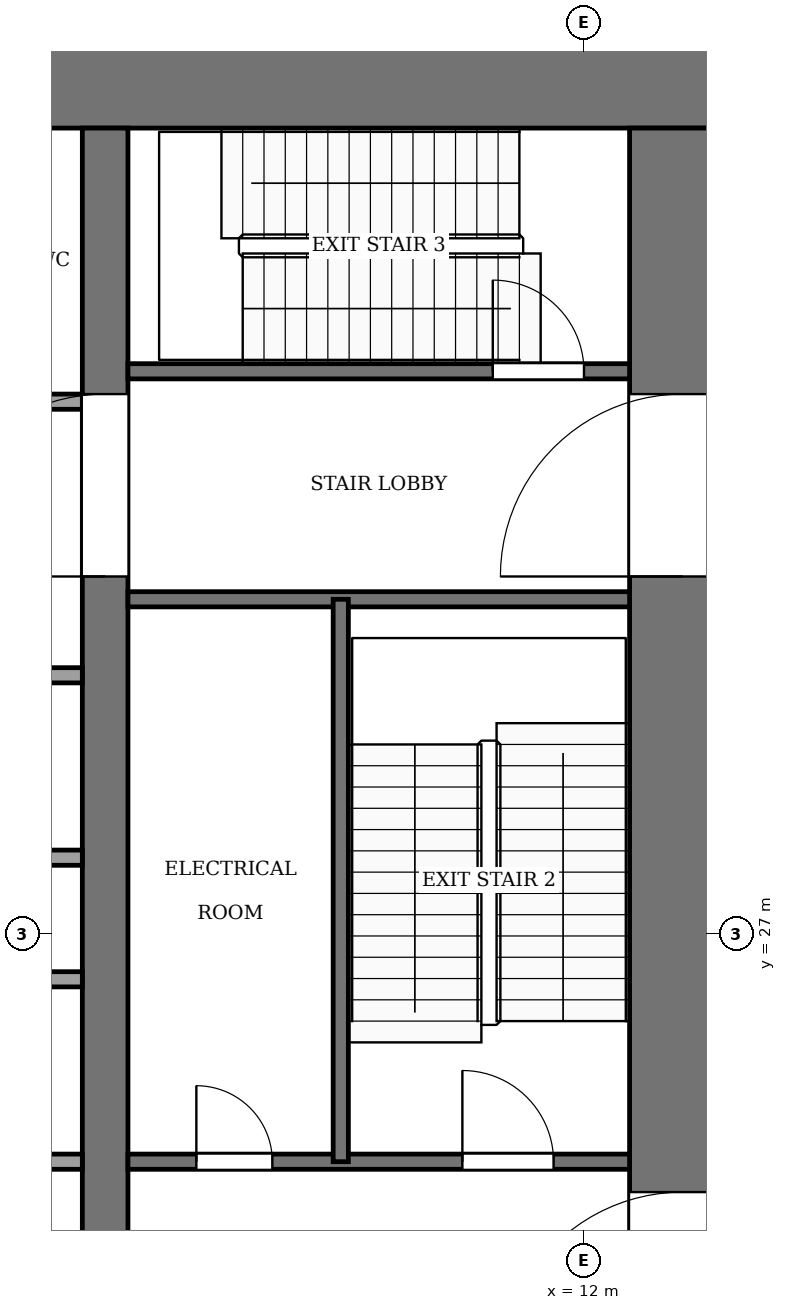
"""IFC4 building model, lengths in metres.
Left out: names, types, materials, properties, quantities, classifications, styles, units other than length and angle.
Written with IfcOpenShell. Run it as: python <this file> out.ifc"""

import sys

from ifc_helpers import new_model, si_unit, direction, frame, frame_2d, origin, place, context, subcontext, project, spatial, rectangle, extrude, element, fill, save


model = new_model("IFC4")
c1 = context("Model", 3, precision=1e-05, world=origin(), true_north=direction((0.0, 1.0)))
c2 = subcontext(c1, "Body", "Model", "MODEL_VIEW")
j1 = project(units=[si_unit("LENGTHUNIT", "METRE"), si_unit("PLANEANGLEUNIT", "RADIAN")], contexts=[c1])
p1 = place(None, origin())
s1 = spatial("IfcSite", under=j1, at=p1, CompositionType="ELEMENT")
p2 = place(p1, origin())
s2 = spatial("IfcBuilding", under=s1, at=p2, CompositionType="ELEMENT")
p3 = place(p2, frame((0.0, 0.0, 9.0)))
s3 = spatial("IfcBuildingStorey", under=s2, at=p3, CompositionType="ELEMENT", Elevation=9.0)
p4 = place(p3, frame((-14.0, 38.3, -0.13), z_axis=(0.0, 0.0, 1.0), x_axis=(1.0, 0.0, 0.0)))
e1 = element("IfcWall", 1, at=p4, inside=s3, PredefinedType="SHEAR", context=c2, shape_type="SweptSolid", body=[
    extrude(rectangle(XDim=28.0, YDim=1.4, at=frame_2d((14.0, 0.0))), origin(), (0.0, 0.0, 1.0), 5.0),
])
p5 = place(p3, frame((13.3, 18.4, -0.13), z_axis=(0.0, 0.0, 1.0), x_axis=(0.0, 1.0, 0.0)))
e2 = element("IfcWall", 2, at=p5, inside=s3, PredefinedType="SHEAR", context=c2, shape_type="SweptSolid", body=[
    extrude(rectangle(XDim=19.2, YDim=1.4, at=frame_2d((9.6, 0.0))), origin(), (0.0, 0.0, 1.0), 5.0),
])
p6 = place(p5, frame((2.8, 0.0, 0.13)))
e3 = element("IfcOpeningElement", 3, at=p6, cuts=e2, PredefinedType="OPENING", context=c2, shape_type="SweptSolid", body=[
    extrude(rectangle(XDim=2.4, YDim=2.4, at=frame_2d((1.2, 1.2))), frame((0.0, 0.71, 0.0), z_axis=(0.0, -1.0, 0.0), x_axis=(1.0, 0.0, 0.0)), (0.0, 0.0, 1.0), 1.42),
])
p7 = place(p5, frame((13.3, 0.0, 0.13)))
e4 = element("IfcOpeningElement", 4, at=p7, cuts=e2, PredefinedType="OPENING", context=c2, shape_type="SweptSolid", body=[
    extrude(rectangle(XDim=2.4, YDim=2.4, at=frame_2d((1.2, 1.2))), frame((0.0, 0.71, 0.0), z_axis=(0.0, -1.0, 0.0), x_axis=(1.0, 0.0, 0.0)), (0.0, 0.0, 1.0), 1.42),
])
p8 = place(p3, frame((5.7, 18.4, -0.13), z_axis=(0.0, 0.0, 1.0), x_axis=(0.0, 1.0, 0.0)))
e5 = element("IfcWall", 5, at=p8, inside=s3, PredefinedType="SHEAR", context=c2, shape_type="SweptSolid", body=[
    extrude(rectangle(XDim=19.2, YDim=0.6, at=frame_2d((9.6, 0.0))), origin(), (0.0, 0.0, 1.0), 5.0),
])
p9 = place(p8, frame((13.3, 0.0, 0.13)))
e6 = element("IfcOpeningElement", 6, at=p9, cuts=e5, PredefinedType="OPENING", context=c2, shape_type="SweptSolid", body=[
    extrude(rectangle(XDim=2.4, YDim=2.4, at=frame_2d((1.2, 1.2))), frame((0.0, 0.31, 0.0), z_axis=(0.0, -1.0, 0.0), x_axis=(1.0, 0.0, 0.0)), (0.0, 0.0, 1.0), 0.62),
])
p10 = place(p3, frame((-5.4, 24.0, 0.0), z_axis=(0.0, 0.0, 1.0), x_axis=(1.0, 0.0, 0.0)))
e7 = element("IfcWall", 7, at=p10, inside=s3, PredefinedType="PARTITIONING", context=c2, shape_type="SweptSolid", body=[
    extrude(rectangle(XDim=10.8, YDim=0.2, at=frame_2d((5.4, 0.0))), origin(), (0.0, 0.0, 1.0), 4.87),
])
p11 = place(p10, frame((0.75, 0.0, 0.0)))
e8 = element("IfcOpeningElement", 8, at=p11, cuts=e7, PredefinedType="OPENING", context=c2, shape_type="SweptSolid", body=[
    extrude(rectangle(XDim=1.2, YDim=2.2, at=frame_2d((0.6, 1.1))), frame((0.0, 0.11, 0.0), z_axis=(0.0, -1.0, 0.0), x_axis=(1.0, 0.0, 0.0)), (0.0, 0.0, 1.0), 0.22),
])
p12 = place(p10, frame((3.45, 0.0, 0.0)))
e9 = element("IfcOpeningElement", 9, at=p12, cuts=e7, PredefinedType="OPENING", context=c2, shape_type="SweptSolid", body=[
    extrude(rectangle(XDim=1.2, YDim=2.2, at=frame_2d((0.6, 1.1))), frame((0.0, 0.11, 0.0), z_axis=(0.0, -1.0, 0.0), x_axis=(1.0, 0.0, 0.0)), (0.0, 0.0, 1.0), 0.22),
])
p13 = place(p10, frame((6.15, 0.0, 0.0)))
e10 = element("IfcOpeningElement", 10, at=p13, cuts=e7, PredefinedType="OPENING", context=c2, shape_type="SweptSolid", body=[
    extrude(rectangle(XDim=1.2, YDim=2.2, at=frame_2d((0.6, 1.1))), frame((0.0, 0.11, 0.0), z_axis=(0.0, -1.0, 0.0), x_axis=(1.0, 0.0, 0.0)), (0.0, 0.0, 1.0), 0.22),
])
p14 = place(p10, frame((8.85, 0.0, 0.0)))
e11 = element("IfcOpeningElement", 11, at=p14, cuts=e7, PredefinedType="OPENING", context=c2, shape_type="SweptSolid", body=[
    extrude(rectangle(XDim=1.2, YDim=2.2, at=frame_2d((0.6, 1.1))), frame((0.0, 0.11, 0.0), z_axis=(0.0, -1.0, 0.0), x_axis=(1.0, 0.0, 0.0)), (0.0, 0.0, 1.0), 0.22),
])
p15 = place(p3, frame((6.0, 24.0, 0.0), z_axis=(0.0, 0.0, 1.0), x_axis=(1.0, 0.0, 0.0)))
e12 = element("IfcWall", 12, at=p15, inside=s3, PredefinedType="PARTITIONING", context=c2, shape_type="SweptSolid", body=[
    extrude(rectangle(XDim=6.6, YDim=0.2, at=frame_2d((3.3, 0.0))), origin(), (0.0, 0.0, 1.0), 4.87),
])
p16 = place(p15, frame((0.9, 0.0, 0.0)))
e13 = element("IfcOpeningElement", 13, at=p16, cuts=e12, PredefinedType="OPENING", context=c2, shape_type="SweptSolid", body=[
    extrude(rectangle(XDim=1.0, YDim=2.1, at=frame_2d((0.5, 1.05))), frame((0.0, 0.11, 0.0), z_axis=(0.0, -1.0, 0.0), x_axis=(1.0, 0.0, 0.0)), (0.0, 0.0, 1.0), 0.22),
])
p17 = place(p15, frame((4.4, 0.0, 0.0)))
e14 = element("IfcOpeningElement", 14, at=p17, cuts=e12, PredefinedType="OPENING", context=c2, shape_type="SweptSolid", body=[
    extrude(rectangle(XDim=1.2, YDim=2.2, at=frame_2d((0.6, 1.1))), frame((0.0, 0.11, 0.0), z_axis=(0.0, -1.0, 0.0), x_axis=(1.0, 0.0, 0.0)), (0.0, 0.0, 1.0), 0.22),
])
for number, where, z_axis, x_axis in (
    (15, (-5.4, 26.4, 0.0), (0.0, 0.0, 1.0), (1.0, 0.0, 0.0)),
    (16, (-5.4, 28.0, 0.0), (0.0, 0.0, 1.0), (1.0, 0.0, 0.0)),
    (17, (-5.4, 30.4, 0.0), (0.0, 0.0, 1.0), (1.0, 0.0, 0.0)),
):
    element("IfcWall", number, at=place(p3, frame(where, z_axis=z_axis, x_axis=x_axis)), inside=s3, PredefinedType="PARTITIONING", context=c2, shape_type="SweptSolid", body=[
        extrude(rectangle(XDim=10.8, YDim=0.2, at=frame_2d((5.4, 0.0))), origin(), (0.0, 0.0, 1.0), 4.87),
    ])
p18 = place(p3, frame((6.0, 31.4, 0.0), z_axis=(0.0, 0.0, 1.0), x_axis=(1.0, 0.0, 0.0)))
e18 = element("IfcWall", 18, at=p18, inside=s3, PredefinedType="PARTITIONING", context=c2, shape_type="SweptSolid", body=[
    extrude(rectangle(XDim=6.6, YDim=0.2, at=frame_2d((3.3, 0.0))), origin(), (0.0, 0.0, 1.0), 4.87),
])
p19 = place(p3, frame((-5.4, 34.0, 0.0), z_axis=(0.0, 0.0, 1.0), x_axis=(1.0, 0.0, 0.0)))
e19 = element("IfcWall", 19, at=p19, inside=s3, PredefinedType="PARTITIONING", context=c2, shape_type="SweptSolid", body=[
    extrude(rectangle(XDim=10.8, YDim=0.2, at=frame_2d((5.4, 0.0))), origin(), (0.0, 0.0, 1.0), 4.87),
])
p20 = place(p19, frame((6.15, 0.0, 0.0)))
e20 = element("IfcOpeningElement", 20, at=p20, cuts=e19, PredefinedType="OPENING", context=c2, shape_type="SweptSolid", body=[
    extrude(rectangle(XDim=1.2, YDim=2.2, at=frame_2d((0.6, 1.1))), frame((0.0, 0.11, 0.0), z_axis=(0.0, -1.0, 0.0), x_axis=(1.0, 0.0, 0.0)), (0.0, 0.0, 1.0), 0.22),
])
p21 = place(p19, frame((8.95, 0.0, 0.0)))
e21 = element("IfcOpeningElement", 21, at=p21, cuts=e19, PredefinedType="OPENING", context=c2, shape_type="SweptSolid", body=[
    extrude(rectangle(XDim=1.0, YDim=2.1, at=frame_2d((0.5, 1.05))), frame((0.0, 0.11, 0.0), z_axis=(0.0, -1.0, 0.0), x_axis=(1.0, 0.0, 0.0)), (0.0, 0.0, 1.0), 0.22),
])
p22 = place(p3, frame((6.0, 34.4, 0.0), z_axis=(0.0, 0.0, 1.0), x_axis=(1.0, 0.0, 0.0)))
e22 = element("IfcWall", 22, at=p22, inside=s3, PredefinedType="PARTITIONING", context=c2, shape_type="SweptSolid", body=[
    extrude(rectangle(XDim=6.6, YDim=0.2, at=frame_2d((3.3, 0.0))), origin(), (0.0, 0.0, 1.0), 4.87),
])
p23 = place(p22, frame((4.8, 0.0, 0.0)))
e23 = element("IfcOpeningElement", 23, at=p23, cuts=e22, PredefinedType="OPENING", context=c2, shape_type="SweptSolid", body=[
    extrude(rectangle(XDim=1.2, YDim=2.2, at=frame_2d((0.6, 1.1))), frame((0.0, 0.11, 0.0), z_axis=(0.0, -1.0, 0.0), x_axis=(1.0, 0.0, 0.0)), (0.0, 0.0, 1.0), 0.22),
])
p24 = place(p3, frame((8.8, 24.0, 0.0), z_axis=(0.0, 0.0, 1.0), x_axis=(0.0, 1.0, 0.0)))
e24 = element("IfcWall", 24, at=p24, inside=s3, PredefinedType="PARTITIONING", context=c2, shape_type="SweptSolid", body=[
    extrude(rectangle(XDim=7.4, YDim=0.2, at=frame_2d((3.7, 0.0))), origin(), (0.0, 0.0, 1.0), 4.87),
])
p25 = place(p16, origin())
e25 = element("IfcDoor", 25, at=p25, inside=s3, OperationType="SINGLE_SWING_LEFT", PredefinedType="DOOR", context=c2, shape_type="SweptSolid", body=[
    extrude(rectangle(XDim=1.0, YDim=2.1, at=frame_2d((0.5, 1.05))), frame((0.0, 0.025, 0.0), z_axis=(0.0, -1.0, 0.0), x_axis=(1.0, 0.0, 0.0)), (0.0, 0.0, 1.0), 0.05),
])
fill(e13, e25)
p26 = place(p17, origin())
e26 = element("IfcDoor", 26, at=p26, inside=s3, OperationType="SINGLE_SWING_LEFT", PredefinedType="DOOR", context=c2, shape_type="SweptSolid", body=[
    extrude(rectangle(XDim=1.2, YDim=2.2, at=frame_2d((0.6, 1.1))), frame((0.0, 0.025, 0.0), z_axis=(0.0, -1.0, 0.0), x_axis=(1.0, 0.0, 0.0)), (0.0, 0.0, 1.0), 0.05),
])
fill(e14, e26)
p27 = place(p23, origin())
e27 = element("IfcDoor", 27, at=p27, inside=s3, OperationType="SINGLE_SWING_RIGHT", PredefinedType="DOOR", context=c2, shape_type="SweptSolid", body=[
    extrude(rectangle(XDim=1.2, YDim=2.2, at=frame_2d((0.6, 1.1))), frame((0.0, 0.025, 0.0), z_axis=(0.0, -1.0, 0.0), x_axis=(1.0, 0.0, 0.0)), (0.0, 0.0, 1.0), 0.05),
])
fill(e23, e27)
p28 = place(p9, origin())
e28 = element("IfcDoor", 28, at=p28, inside=s3, OperationType="DOUBLE_DOOR_SINGLE_SWING", PredefinedType="DOOR", context=c2, shape_type="SweptSolid", body=[
    extrude(rectangle(XDim=2.4, YDim=2.4, at=frame_2d((1.2, 1.2))), frame((0.0, 0.025, 0.0), z_axis=(0.0, -1.0, 0.0), x_axis=(1.0, 0.0, 0.0)), (0.0, 0.0, 1.0), 0.05),
])
fill(e6, e28)
p29 = place(p6, origin())
e29 = element("IfcDoor", 29, at=p29, inside=s3, OperationType="DOUBLE_DOOR_SINGLE_SWING", PredefinedType="DOOR", context=c2, shape_type="SweptSolid", body=[
    extrude(rectangle(XDim=2.4, YDim=2.4, at=frame_2d((1.2, 1.2))), frame((0.0, 0.025, 0.0), z_axis=(0.0, -1.0, 0.0), x_axis=(1.0, 0.0, 0.0)), (0.0, 0.0, 1.0), 0.05),
])
fill(e3, e29)
p30 = place(p7, origin())
e30 = element("IfcDoor", 30, at=p30, inside=s3, OperationType="DOUBLE_DOOR_SINGLE_SWING", PredefinedType="DOOR", context=c2, shape_type="SweptSolid", body=[
    extrude(rectangle(XDim=2.4, YDim=2.4, at=frame_2d((1.2, 1.2))), frame((0.0, 0.025, 0.0), z_axis=(0.0, -1.0, 0.0), x_axis=(1.0, 0.0, 0.0)), (0.0, 0.0, 1.0), 0.05),
])
fill(e4, e30)
save(model, sys.argv[1])
